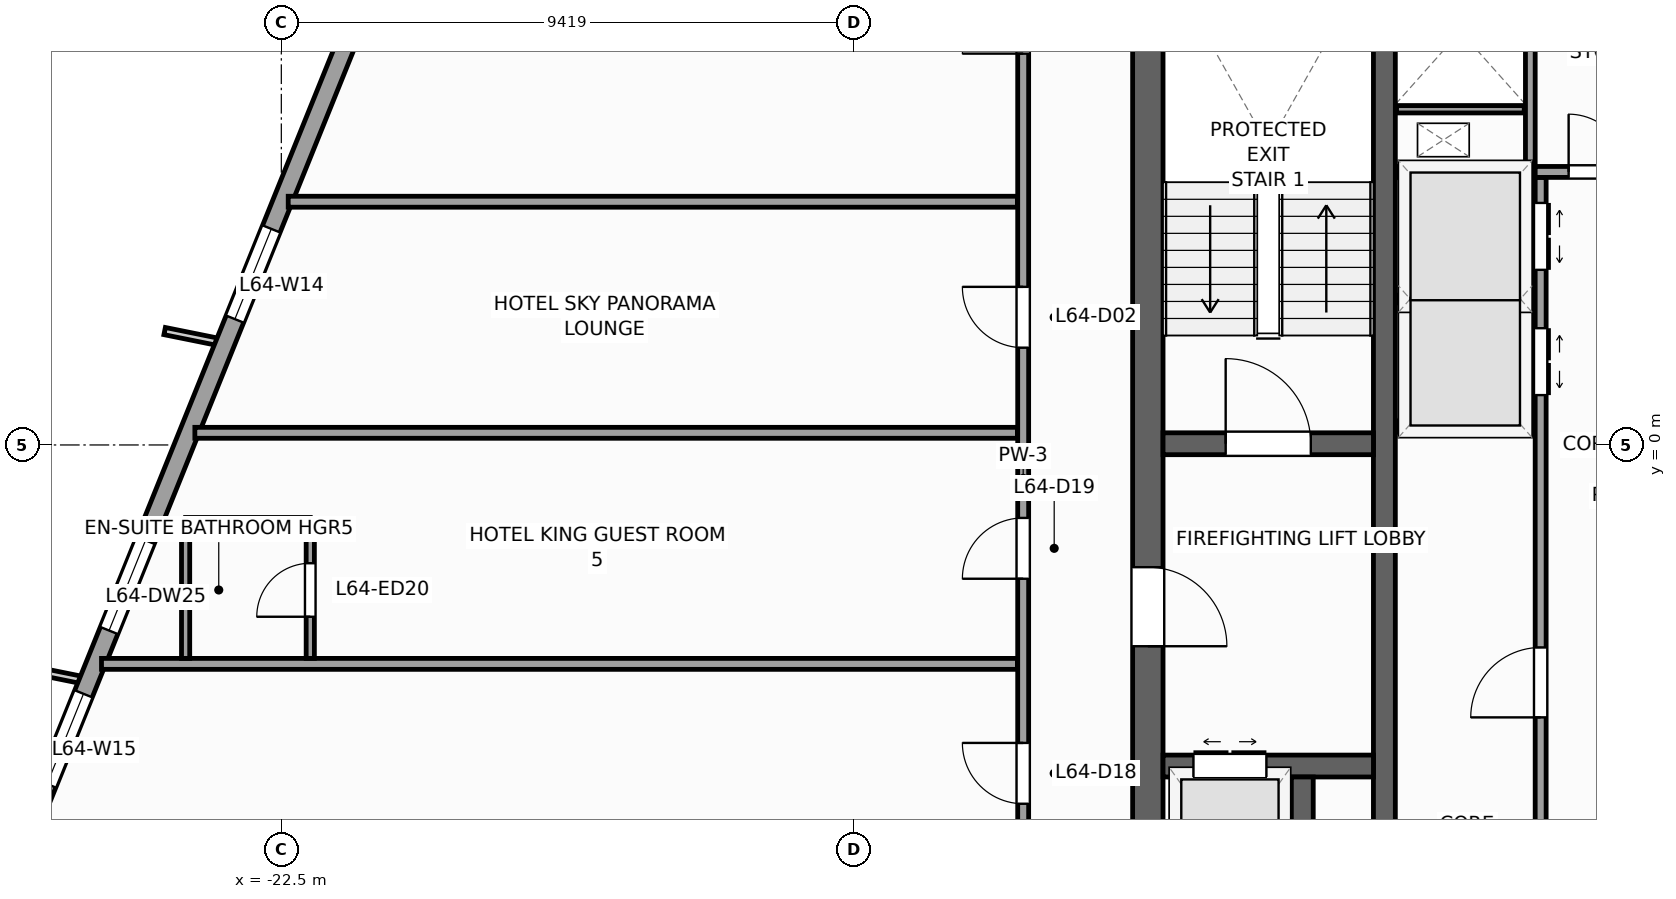
"""IFC4 building model, lengths in metres.
Left out: names, types, materials, properties, quantities, classifications, styles, units other than length and angle.
Written with IfcOpenShell. Run it as: python <this file> out.ifc"""

import sys

from ifc_helpers import new_model, si_unit, direction, frame, frame_2d, origin, place, context, subcontext, project, spatial, rectangle, extrude, source, transform, mapped, element, fill, save


model = new_model("IFC4")
c1 = context("Model", 3, precision=1e-05, world=origin(), true_north=direction((0.0, 1.0)))
c2 = subcontext(c1, "Body", "Model", "MODEL_VIEW")
j1 = project(units=[si_unit("LENGTHUNIT", "METRE"), si_unit("PLANEANGLEUNIT", "RADIAN")], contexts=[c1])
p1 = place(None, origin())
s1 = spatial("IfcSite", under=j1, at=p1, CompositionType="ELEMENT")
p2 = place(p1, origin())
s2 = spatial("IfcBuilding", under=s1, at=p2, CompositionType="ELEMENT")
p3 = place(p2, frame((0.0, 0.0, 265.2)))
s3 = spatial("IfcBuildingStorey", under=s2, at=p3, CompositionType="ELEMENT", Elevation=265.2)
p4 = place(p3, frame((-8.25, -8.0, 0.0), z_axis=(0.0, 0.0, 1.0), x_axis=(0.0, 1.0, 0.0)))
e1 = element("IfcWall", 1, at=p4, inside=s3, PredefinedType="SHEAR", context=c2, shape_type="SweptSolid", body=[
    extrude(rectangle(XDim=16.0, YDim=0.5, at=frame_2d((8.0, 0.0))), origin(), (0.0, 0.0, 1.0), 3.6),
])
p5 = place(p4, frame((4.69, 0.0, 0.0)))
e2 = element("IfcOpeningElement", 2, at=p5, cuts=e1, PredefinedType="OPENING", context=c2, shape_type="SweptSolid", body=[
    extrude(rectangle(XDim=1.3, YDim=2.2, at=frame_2d((0.65, 1.1))), frame((0.0, 0.26, 0.0), z_axis=(0.0, -1.0, 0.0), x_axis=(1.0, 0.0, 0.0)), (0.0, 0.0, 1.0), 0.52),
])
p6 = place(p3, frame((-4.36, -8.0, 0.0), z_axis=(0.0, 0.0, 1.0), x_axis=(0.0, 1.0, 0.0)))
e3 = element("IfcWall", 3, at=p6, inside=s3, PredefinedType="SHEAR", context=c2, shape_type="SweptSolid", body=[
    extrude(rectangle(XDim=16.0, YDim=0.36, at=frame_2d((8.0, 0.0))), origin(), (0.0, 0.0, 1.0), 3.6),
])
p7 = place(p3, frame((-8.0, 0.02, 0.0), z_axis=(0.0, 0.0, 1.0), x_axis=(1.0, 0.0, 0.0)))
e4 = element("IfcWall", 4, at=p7, inside=s3, PredefinedType="SHEAR", context=c2, shape_type="SweptSolid", body=[
    extrude(rectangle(XDim=3.46, YDim=0.36, at=frame_2d((1.73, 0.0))), origin(), (0.0, 0.0, 1.0), 3.6),
])
p8 = place(p7, frame((1.03, 0.0, 0.0)))
e5 = element("IfcOpeningElement", 5, at=p8, cuts=e4, PredefinedType="OPENING", context=c2, shape_type="SweptSolid", body=[
    extrude(rectangle(XDim=1.4, YDim=2.2, at=frame_2d((0.7, 1.1))), frame((0.0, 0.19, 0.0), z_axis=(0.0, -1.0, 0.0), x_axis=(1.0, 0.0, 0.0)), (0.0, 0.0, 1.0), 0.38),
])
p9 = place(p3, frame((-8.0, -5.28, 0.0), z_axis=(0.0, 0.0, 1.0), x_axis=(1.0, 0.0, 0.0)))
e6 = element("IfcWall", 6, at=p9, inside=s3, PredefinedType="SHEAR", context=c2, shape_type="SweptSolid", body=[
    extrude(rectangle(XDim=3.46, YDim=0.36, at=frame_2d((1.73, 0.0))), origin(), (0.0, 0.0, 1.0), 3.6),
])
p10 = place(p9, frame((0.5, 0.0, 0.0)))
e7 = element("IfcOpeningElement", 7, at=p10, cuts=e6, PredefinedType="OPENING", context=c2, shape_type="SweptSolid", body=[
    extrude(rectangle(XDim=1.2, YDim=2.25, at=frame_2d((0.6, 1.125))), frame((0.0, 0.19, 0.0), z_axis=(0.0, -1.0, 0.0), x_axis=(1.0, 0.0, 0.0)), (0.0, 0.0, 1.0), 0.38),
])
p11 = place(p3, frame((-5.71, -8.0, 0.0), z_axis=(0.0, 0.0, 1.0), x_axis=(0.0, 1.0, 0.0)))
e8 = element("IfcWall", 8, at=p11, inside=s3, PredefinedType="SHEAR", context=c2, shape_type="SweptSolid", body=[
    extrude(rectangle(XDim=2.54, YDim=0.36, at=frame_2d((1.27, 0.0))), origin(), (0.0, 0.0, 1.0), 3.6),
])
p12 = place(p3, frame((-14.479, 23.813, 0.0), z_axis=(0.0, 0.0, 1.0), x_axis=(-0.374609557019, -0.927182657188, 0.0)))
e9 = element("IfcWall", 9, at=p12, inside=s3, PredefinedType="STANDARD", context=c2, shape_type="SweptSolid", body=[
    extrude(rectangle(XDim=33.31, YDim=0.31, at=frame_2d((16.655, 0.0))), origin(), (0.0, 0.0, 1.0), 2.75),
])
p13 = place(p12, frame((3.197, 0.0, 0.47)))
e10 = element("IfcOpeningElement", 10, at=p13, cuts=e9, PredefinedType="OPENING", context=c2, shape_type="SweptSolid", body=[
    extrude(rectangle(XDim=1.6, YDim=2.1, at=frame_2d((0.8, 1.05))), frame((0.0, 0.165, 0.0), z_axis=(0.0, -1.0, 0.0), x_axis=(1.0, 0.0, 0.0)), (0.0, 0.0, 1.0), 0.33),
])
p14 = place(p12, frame((8.86, 0.0, 0.47)))
e11 = element("IfcOpeningElement", 11, at=p14, cuts=e9, PredefinedType="OPENING", context=c2, shape_type="SweptSolid", body=[
    extrude(rectangle(XDim=1.6, YDim=2.1, at=frame_2d((0.8, 1.05))), frame((0.0, 0.165, 0.0), z_axis=(0.0, -1.0, 0.0), x_axis=(1.0, 0.0, 0.0)), (0.0, 0.0, 1.0), 0.33),
])
p15 = place(p12, frame((14.439, 0.0, 0.47)))
e12 = element("IfcOpeningElement", 12, at=p15, cuts=e9, PredefinedType="OPENING", context=c2, shape_type="SweptSolid", body=[
    extrude(rectangle(XDim=1.6, YDim=2.1, at=frame_2d((0.8, 1.05))), frame((0.0, 0.165, 0.0), z_axis=(0.0, -1.0, 0.0), x_axis=(1.0, 0.0, 0.0)), (0.0, 0.0, 1.0), 0.33),
])
p16 = place(p12, frame((21.851, 0.0, 0.47)))
e13 = element("IfcOpeningElement", 13, at=p16, cuts=e9, PredefinedType="OPENING", context=c2, shape_type="SweptSolid", body=[
    extrude(rectangle(XDim=1.6, YDim=2.1, at=frame_2d((0.8, 1.05))), frame((0.0, 0.165, 0.0), z_axis=(0.0, -1.0, 0.0), x_axis=(1.0, 0.0, 0.0)), (0.0, 0.0, 1.0), 0.33),
])
p17 = place(p12, frame((30.097, 0.0, 0.47)))
e14 = element("IfcOpeningElement", 14, at=p17, cuts=e9, PredefinedType="OPENING", context=c2, shape_type="SweptSolid", body=[
    extrude(rectangle(XDim=1.6, YDim=2.1, at=frame_2d((0.8, 1.05))), frame((0.0, 0.165, 0.0), z_axis=(0.0, -1.0, 0.0), x_axis=(1.0, 0.0, 0.0)), (0.0, 0.0, 1.0), 0.33),
])
p18 = place(p12, frame((27.374, 0.0, 0.47)))
e15 = element("IfcOpeningElement", 15, at=p18, cuts=e9, PredefinedType="OPENING", context=c2, shape_type="SweptSolid", body=[
    extrude(rectangle(XDim=1.6, YDim=2.1, at=frame_2d((0.8, 1.05))), frame((0.0, 0.165, 0.0), z_axis=(0.0, -1.0, 0.0), x_axis=(1.0, 0.0, 0.0)), (0.0, 0.0, 1.0), 0.33),
])
p19 = place(p3, frame((-1.79, -7.98, 0.0), z_axis=(0.0, 0.0, 1.0), x_axis=(0.0, 1.0, 0.0)))
e16 = element("IfcWall", 16, at=p19, inside=s3, PredefinedType="PARTITIONING", context=c2, shape_type="SweptSolid", body=[
    extrude(rectangle(XDim=12.38, YDim=0.18, at=frame_2d((6.19, 0.0))), origin(), (0.0, 0.0, 1.0), 3.35),
])
p20 = place(p19, frame((8.8, 0.0, 0.0)))
e17 = element("IfcOpeningElement", 17, at=p20, cuts=e16, PredefinedType="OPENING", context=c2, shape_type="SweptSolid", body=[
    extrude(rectangle(XDim=1.1, YDim=2.2, at=frame_2d((0.55, 1.1))), frame((0.0, 0.1, 0.0), z_axis=(0.0, -1.0, 0.0), x_axis=(1.0, 0.0, 0.0)), (0.0, 0.0, 1.0), 0.2),
])
p21 = place(p19, frame((10.86, 0.0, 0.0)))
e18 = element("IfcOpeningElement", 18, at=p21, cuts=e16, PredefinedType="OPENING", context=c2, shape_type="SweptSolid", body=[
    extrude(rectangle(XDim=1.1, YDim=2.2, at=frame_2d((0.55, 1.1))), frame((0.0, 0.1, 0.0), z_axis=(0.0, -1.0, 0.0), x_axis=(1.0, 0.0, 0.0)), (0.0, 0.0, 1.0), 0.2),
])
p22 = place(p19, frame((3.5, 0.0, 0.0)))
e19 = element("IfcOpeningElement", 19, at=p22, cuts=e16, PredefinedType="OPENING", context=c2, shape_type="SweptSolid", body=[
    extrude(rectangle(XDim=1.15, YDim=2.25, at=frame_2d((0.575, 1.125))), frame((0.0, 0.1, 0.0), z_axis=(0.0, -1.0, 0.0), x_axis=(1.0, 0.0, 0.0)), (0.0, 0.0, 1.0), 0.2),
])
p23 = place(p3, frame((-1.88, 4.49, 0.0), z_axis=(0.0, 0.0, 1.0), x_axis=(1.0, 0.0, 0.0)))
e20 = element("IfcWall", 20, at=p23, inside=s3, PredefinedType="PARTITIONING", context=c2, shape_type="SweptSolid", body=[
    extrude(rectangle(XDim=3.76, YDim=0.18, at=frame_2d((1.88, 0.0))), origin(), (0.0, 0.0, 1.0), 3.35),
])
p24 = place(p23, frame((0.55, 0.0, 0.0)))
e21 = element("IfcOpeningElement", 21, at=p24, cuts=e20, PredefinedType="OPENING", context=c2, shape_type="SweptSolid", body=[
    extrude(rectangle(XDim=0.95, YDim=2.1, at=frame_2d((0.475, 1.05))), frame((0.0, 0.1, 0.0), z_axis=(0.0, -1.0, 0.0), x_axis=(1.0, 0.0, 0.0)), (0.0, 0.0, 1.0), 0.2),
])
p25 = place(p23, frame((2.56, 0.0, 0.0)))
e22 = element("IfcOpeningElement", 22, at=p25, cuts=e20, PredefinedType="OPENING", context=c2, shape_type="SweptSolid", body=[
    extrude(rectangle(XDim=0.88, YDim=2.1, at=frame_2d((0.44, 1.05))), frame((0.0, 0.1, 0.0), z_axis=(0.0, -1.0, 0.0), x_axis=(1.0, 0.0, 0.0)), (0.0, 0.0, 1.0), 0.2),
])
for number, where, z_axis, x_axis in (
    (23, (-4.17, 0.3, 0.0), (0.0, 0.0, 1.0), (1.0, 0.0, 0.0)),
    (24, (-4.17, 4.49, 0.0), (0.0, 0.0, 1.0), (1.0, 0.0, 0.0)),
):
    element("IfcWall", number, at=place(p3, frame(where, z_axis=z_axis, x_axis=x_axis)), inside=s3, PredefinedType="PARTITIONING", context=c2, shape_type="SweptSolid", body=[
        extrude(rectangle(XDim=2.28, YDim=0.18, at=frame_2d((1.14, 0.0))), origin(), (0.0, 0.0, 1.0), 3.35),
    ])
p26 = place(p3, frame((-4.16, 2.4, 0.0), z_axis=(0.0, 0.0, 1.0), x_axis=(1.0, 0.0, 0.0)))
e25 = element("IfcWall", 25, at=p26, inside=s3, PredefinedType="PARTITIONING", context=c2, shape_type="SweptSolid", body=[
    extrude(rectangle(XDim=2.26, YDim=0.12, at=frame_2d((1.13, 0.0))), origin(), (0.0, 0.0, 1.0), 3.35),
])
p27 = place(p3, frame((-1.96, 4.58, 0.0), z_axis=(0.0, 0.0, 1.0), x_axis=(0.0, 1.0, 0.0)))
e26 = element("IfcWall", 26, at=p27, inside=s3, PredefinedType="PARTITIONING", context=c2, shape_type="SweptSolid", body=[
    extrude(rectangle(XDim=3.4, YDim=0.16, at=frame_2d((1.7, 0.0))), origin(), (0.0, 0.0, 1.0), 3.35),
])
p28 = place(p3, frame((-4.16, 5.52, 0.0), z_axis=(0.0, 0.0, 1.0), x_axis=(1.0, 0.0, 0.0)))
e27 = element("IfcWall", 27, at=p28, inside=s3, PredefinedType="PARTITIONING", context=c2, shape_type="SweptSolid", body=[
    extrude(rectangle(XDim=2.1, YDim=0.12, at=frame_2d((1.05, 0.0))), origin(), (0.0, 0.0, 1.0), 3.35),
])
p29 = place(p3, frame((-10.3, -11.3, 0.0), z_axis=(0.0, 0.0, 1.0), x_axis=(0.0, 1.0, 0.0)))
e28 = element("IfcWall", 28, at=p29, inside=s3, PredefinedType="PARTITIONING", context=c2, shape_type="SweptSolid", body=[
    extrude(rectangle(XDim=21.5, YDim=0.18, at=frame_2d((10.75, 0.0))), origin(), (0.0, 0.0, 1.0), 3.35),
])
p30 = place(p29, frame((12.9, 0.0, 0.0)))
e29 = element("IfcOpeningElement", 29, at=p30, cuts=e28, PredefinedType="OPENING", context=c2, shape_type="SweptSolid", body=[
    extrude(rectangle(XDim=1.0, YDim=2.15, at=frame_2d((0.5, 1.075))), frame((0.0, 0.1, 0.0), z_axis=(0.0, -1.0, 0.0), x_axis=(1.0, 0.0, 0.0)), (0.0, 0.0, 1.0), 0.2),
])
p31 = place(p29, frame((17.736, 0.0, 0.0)))
e30 = element("IfcOpeningElement", 30, at=p31, cuts=e28, PredefinedType="OPENING", context=c2, shape_type="SweptSolid", body=[
    extrude(rectangle(XDim=1.0, YDim=2.15, at=frame_2d((0.5, 1.075))), frame((0.0, 0.1, 0.0), z_axis=(0.0, -1.0, 0.0), x_axis=(1.0, 0.0, 0.0)), (0.0, 0.0, 1.0), 0.2),
])
p32 = place(p29, frame((1.714, 0.0, 0.0)))
e31 = element("IfcOpeningElement", 31, at=p32, cuts=e28, PredefinedType="OPENING", context=c2, shape_type="SweptSolid", body=[
    extrude(rectangle(XDim=1.0, YDim=2.15, at=frame_2d((0.5, 1.075))), frame((0.0, 0.1, 0.0), z_axis=(0.0, -1.0, 0.0), x_axis=(1.0, 0.0, 0.0)), (0.0, 0.0, 1.0), 0.2),
])
p33 = place(p29, frame((5.4, 0.0, 0.0)))
e32 = element("IfcOpeningElement", 32, at=p33, cuts=e28, PredefinedType="OPENING", context=c2, shape_type="SweptSolid", body=[
    extrude(rectangle(XDim=1.0, YDim=2.15, at=frame_2d((0.5, 1.075))), frame((0.0, 0.1, 0.0), z_axis=(0.0, -1.0, 0.0), x_axis=(1.0, 0.0, 0.0)), (0.0, 0.0, 1.0), 0.2),
])
p34 = place(p29, frame((9.1, 0.0, 0.0)))
e33 = element("IfcOpeningElement", 33, at=p34, cuts=e28, PredefinedType="OPENING", context=c2, shape_type="SweptSolid", body=[
    extrude(rectangle(XDim=1.0, YDim=2.15, at=frame_2d((0.5, 1.075))), frame((0.0, 0.1, 0.0), z_axis=(0.0, -1.0, 0.0), x_axis=(1.0, 0.0, 0.0)), (0.0, 0.0, 1.0), 0.2),
])
p35 = place(p3, frame((-10.395, -3.6, 0.0), z_axis=(0.0, 0.0, 1.0), x_axis=(-1.0, 0.0, 0.0)))
e34 = element("IfcWall", 34, at=p35, inside=s3, PredefinedType="PARTITIONING", context=c2, shape_type="SweptSolid", body=[
    extrude(rectangle(XDim=15.062, YDim=0.18, at=frame_2d((7.531, 0.0))), origin(), (0.0, 0.0, 1.0), 3.02),
])
p36 = place(p3, frame((-10.395, 0.2, 0.0), z_axis=(0.0, 0.0, 1.0), x_axis=(-1.0, 0.0, 0.0)))
e35 = element("IfcWall", 35, at=p36, inside=s3, PredefinedType="PARTITIONING", context=c2, shape_type="SweptSolid", body=[
    extrude(rectangle(XDim=13.527, YDim=0.18, at=frame_2d((6.763, 0.0))), origin(), (0.0, 0.0, 1.0), 3.02),
])
p37 = place(p3, frame((-10.395, 4.0, 0.0), z_axis=(0.0, 0.0, 1.0), x_axis=(-1.0, 0.0, 0.0)))
e36 = element("IfcWall", 36, at=p37, inside=s3, PredefinedType="PARTITIONING", context=c2, shape_type="SweptSolid", body=[
    extrude(rectangle(XDim=11.992, YDim=0.18, at=frame_2d((5.996, 0.0))), origin(), (0.0, 0.0, 1.0), 3.02),
])
p38 = place(p3, frame((-22.024, -3.51, 0.0), z_axis=(0.0, 0.0, 1.0), x_axis=(0.0, 1.0, 0.0)))
e37 = element("IfcWall", 37, at=p38, inside=s3, PredefinedType="PARTITIONING", context=c2, shape_type="SweptSolid", body=[
    extrude(rectangle(XDim=2.25, YDim=0.135, at=frame_2d((1.125, 0.0))), origin(), (0.0, 0.0, 1.0), 3.35),
])
p39 = place(p38, frame((0.685, 0.0, 0.0)))
e38 = element("IfcOpeningElement", 38, at=p39, cuts=e37, PredefinedType="OPENING", context=c2, shape_type="SweptSolid", body=[
    extrude(rectangle(XDim=0.88, YDim=2.1, at=frame_2d((0.44, 1.05))), frame((0.0, 0.078, 0.0), z_axis=(0.0, -1.0, 0.0), x_axis=(1.0, 0.0, 0.0)), (0.0, 0.0, 1.0), 0.155),
])
p40 = place(p3, frame((-24.074, -1.26, 0.0), z_axis=(0.0, 0.0, 1.0), x_axis=(1.0, 0.0, 0.0)))
e39 = element("IfcWall", 39, at=p40, inside=s3, PredefinedType="PARTITIONING", context=c2, shape_type="SweptSolid", body=[
    extrude(rectangle(XDim=2.05, YDim=0.135, at=frame_2d((1.025, 0.0))), origin(), (0.0, 0.0, 1.0), 3.35),
])
p41 = place(p3, frame((-24.074, -3.51, 0.0), z_axis=(0.0, 0.0, 1.0), x_axis=(0.0, 1.0, 0.0)))
e40 = element("IfcWall", 40, at=p41, inside=s3, PredefinedType="PARTITIONING", context=c2, shape_type="SweptSolid", body=[
    extrude(rectangle(XDim=2.25, YDim=0.135, at=frame_2d((1.125, 0.0))), origin(), (0.0, 0.0, 1.0), 3.35),
])
m1 = source(origin(), c2, "Body", "SweptSolid", [
    extrude(rectangle(XDim=1.6, YDim=2.1, at=frame_2d((0.8, 1.05))), frame((0.0, 0.03, 0.0), z_axis=(0.0, -1.0, 0.0), x_axis=(1.0, 0.0, 0.0)), (0.0, 0.0, 1.0), 0.06),
])
p42 = place(p16, origin())
e41 = element("IfcWindow", 41, at=p42, inside=s3, PartitioningType="SINGLE_PANEL", PredefinedType="WINDOW", context=c2, shape_type="MappedRepresentation", body=[
    mapped(m1, transform((0.0, 0.0, 0.0), scale=1.0)),
])
fill(e13, e41)
p43 = place(p17, origin())
e42 = element("IfcWindow", 42, at=p43, inside=s3, PartitioningType="SINGLE_PANEL", PredefinedType="WINDOW", context=c2, shape_type="MappedRepresentation", body=[
    mapped(m1, transform((0.0, 0.0, 0.0), scale=1.0)),
])
fill(e14, e42)
m2 = source(origin(), c2, "Body", "SweptSolid", [
    extrude(rectangle(XDim=1.4, YDim=2.2, at=frame_2d((0.7, 1.1))), frame((0.0, 0.025, 0.0), z_axis=(0.0, -1.0, 0.0), x_axis=(1.0, 0.0, 0.0)), (0.0, 0.0, 1.0), 0.05),
])
p44 = place(p8, origin())
e43 = element("IfcDoor", 43, at=p44, inside=s3, OperationType="SINGLE_SWING_LEFT", PredefinedType="DOOR", context=c2, shape_type="MappedRepresentation", body=[
    mapped(m2, transform((0.0, 0.0, 0.0), scale=1.0)),
])
fill(e5, e43)
m3 = source(origin(), c2, "Body", "SweptSolid", [
    extrude(rectangle(XDim=1.3, YDim=2.2, at=frame_2d((0.65, 1.1))), frame((0.0, 0.025, 0.0), z_axis=(0.0, -1.0, 0.0), x_axis=(1.0, 0.0, 0.0)), (0.0, 0.0, 1.0), 0.05),
])
p45 = place(p5, frame((1.3, 0.0, 0.0), z_axis=(0.0, 0.0, 1.0), x_axis=(-1.0, 0.0, 0.0)))
e44 = element("IfcDoor", 44, at=p45, inside=s3, OperationType="SINGLE_SWING_LEFT", PredefinedType="DOOR", context=c2, shape_type="MappedRepresentation", body=[
    mapped(m3, transform((0.0, 0.0, 0.0), scale=1.0)),
])
fill(e2, e44)
m4 = source(origin(), c2, "Body", "SweptSolid", [
    extrude(rectangle(XDim=1.2, YDim=2.25, at=frame_2d((0.6, 1.125))), frame((0.0, 0.025, 0.0), z_axis=(0.0, -1.0, 0.0), x_axis=(1.0, 0.0, 0.0)), (0.0, 0.0, 1.0), 0.05),
])
p46 = place(p10, origin())
e45 = element("IfcDoor", 45, at=p46, inside=s3, OperationType="DOUBLE_DOOR_SLIDING", PredefinedType="DOOR", context=c2, shape_type="MappedRepresentation", body=[
    mapped(m4, transform((0.0, 0.0, 0.0), scale=1.0)),
])
fill(e7, e45)
m5 = source(origin(), c2, "Body", "SweptSolid", [
    extrude(rectangle(XDim=1.1, YDim=2.2, at=frame_2d((0.55, 1.1))), frame((0.0, 0.025, 0.0), z_axis=(0.0, -1.0, 0.0), x_axis=(1.0, 0.0, 0.0)), (0.0, 0.0, 1.0), 0.05),
])
p47 = place(p20, frame((1.1, 0.0, 0.0), z_axis=(0.0, 0.0, 1.0), x_axis=(-1.0, 0.0, 0.0)))
e46 = element("IfcDoor", 46, at=p47, inside=s3, OperationType="DOUBLE_DOOR_SLIDING", PredefinedType="DOOR", context=c2, shape_type="MappedRepresentation", body=[
    mapped(m5, transform((0.0, 0.0, 0.0), scale=1.0)),
])
fill(e17, e46)
p48 = place(p21, frame((1.1, 0.0, 0.0), z_axis=(0.0, 0.0, 1.0), x_axis=(-1.0, 0.0, 0.0)))
e47 = element("IfcDoor", 47, at=p48, inside=s3, OperationType="DOUBLE_DOOR_SLIDING", PredefinedType="DOOR", context=c2, shape_type="MappedRepresentation", body=[
    mapped(m5, transform((0.0, 0.0, 0.0), scale=1.0)),
])
fill(e18, e47)
m6 = source(origin(), c2, "Body", "SweptSolid", [
    extrude(rectangle(XDim=1.15, YDim=2.25, at=frame_2d((0.575, 1.125))), frame((0.0, 0.025, 0.0), z_axis=(0.0, -1.0, 0.0), x_axis=(1.0, 0.0, 0.0)), (0.0, 0.0, 1.0), 0.05),
])
p49 = place(p22, origin())
e48 = element("IfcDoor", 48, at=p49, inside=s3, OperationType="SINGLE_SWING_LEFT", PredefinedType="DOOR", context=c2, shape_type="MappedRepresentation", body=[
    mapped(m6, transform((0.0, 0.0, 0.0), scale=1.0)),
])
fill(e19, e48)
m7 = source(origin(), c2, "Body", "SweptSolid", [
    extrude(rectangle(XDim=0.95, YDim=2.1, at=frame_2d((0.475, 1.05))), frame((0.0, 0.025, 0.0), z_axis=(0.0, -1.0, 0.0), x_axis=(1.0, 0.0, 0.0)), (0.0, 0.0, 1.0), 0.05),
])
p50 = place(p24, origin())
e49 = element("IfcDoor", 49, at=p50, inside=s3, OperationType="SINGLE_SWING_LEFT", PredefinedType="DOOR", context=c2, shape_type="MappedRepresentation", body=[
    mapped(m7, transform((0.0, 0.0, 0.0), scale=1.0)),
])
fill(e21, e49)
m8 = source(origin(), c2, "Body", "SweptSolid", [
    extrude(rectangle(XDim=1.0, YDim=2.15, at=frame_2d((0.5, 1.075))), frame((0.0, 0.025, 0.0), z_axis=(0.0, -1.0, 0.0), x_axis=(1.0, 0.0, 0.0)), (0.0, 0.0, 1.0), 0.05),
])
p51 = place(p30, origin())
e50 = element("IfcDoor", 50, at=p51, inside=s3, OperationType="SINGLE_SWING_RIGHT", PredefinedType="DOOR", context=c2, shape_type="MappedRepresentation", body=[
    mapped(m8, transform((0.0, 0.0, 0.0), scale=1.0)),
])
fill(e29, e50)
p52 = place(p31, origin())
e51 = element("IfcDoor", 51, at=p52, inside=s3, OperationType="SINGLE_SWING_LEFT", PredefinedType="DOOR", context=c2, shape_type="MappedRepresentation", body=[
    mapped(m8, transform((0.0, 0.0, 0.0), scale=1.0)),
])
fill(e30, e51)
p53 = place(p33, origin())
e52 = element("IfcDoor", 52, at=p53, inside=s3, OperationType="SINGLE_SWING_RIGHT", PredefinedType="DOOR", context=c2, shape_type="MappedRepresentation", body=[
    mapped(m8, transform((0.0, 0.0, 0.0), scale=1.0)),
])
fill(e32, e52)
p54 = place(p34, origin())
e53 = element("IfcDoor", 53, at=p54, inside=s3, OperationType="SINGLE_SWING_LEFT", PredefinedType="DOOR", context=c2, shape_type="MappedRepresentation", body=[
    mapped(m8, transform((0.0, 0.0, 0.0), scale=1.0)),
])
fill(e33, e53)
m9 = source(origin(), c2, "Body", "SweptSolid", [
    extrude(rectangle(XDim=0.88, YDim=2.1, at=frame_2d((0.44, 1.05))), frame((0.0, 0.025, 0.0), z_axis=(0.0, -1.0, 0.0), x_axis=(1.0, 0.0, 0.0)), (0.0, 0.0, 1.0), 0.05),
])
p55 = place(p39, origin())
e54 = element("IfcDoor", 54, at=p55, inside=s3, OperationType="SINGLE_SWING_LEFT", PredefinedType="DOOR", context=c2, shape_type="MappedRepresentation", body=[
    mapped(m9, transform((0.0, 0.0, 0.0), scale=1.0)),
])
fill(e38, e54)
p56 = place(p18, origin())
e55 = element("IfcWindow", 55, at=p56, inside=s3, PartitioningType="SINGLE_PANEL", PredefinedType="WINDOW", context=c2, shape_type="MappedRepresentation", body=[
    mapped(m1, transform((0.0, 0.0, 0.0), scale=1.0)),
])
fill(e15, e55)
save(model, sys.argv[1])
